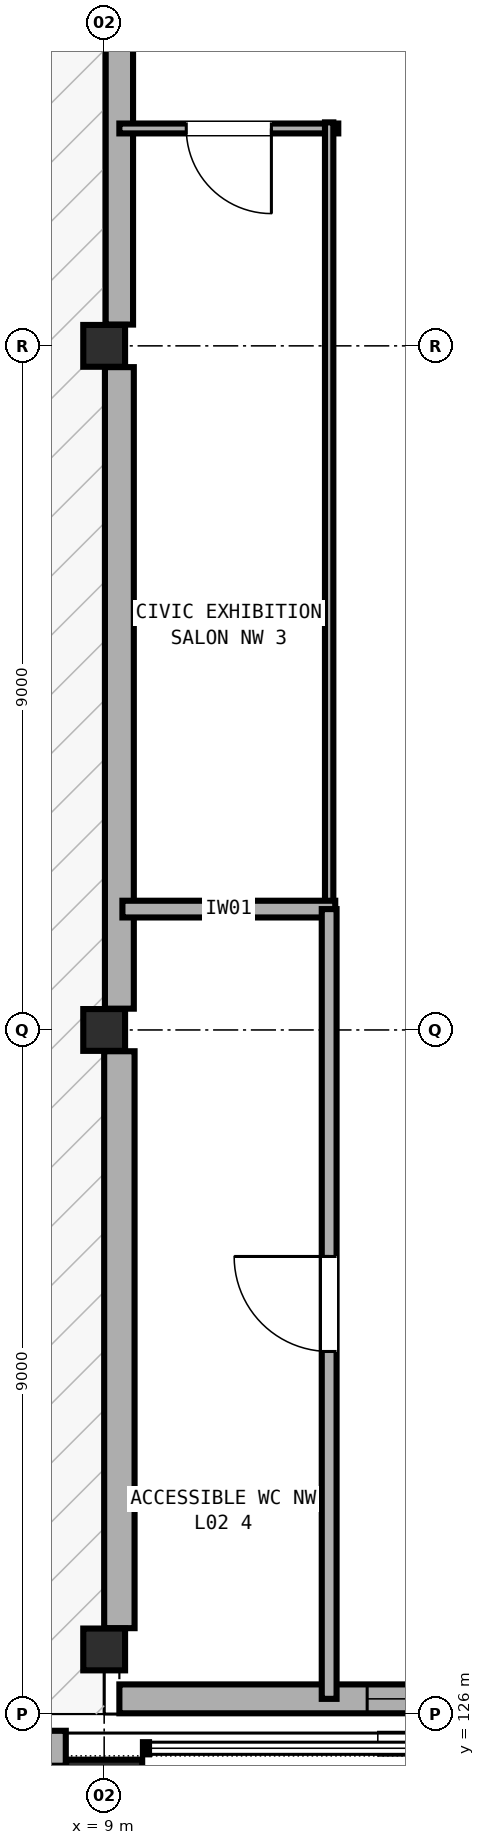
"""IFC4 building model, lengths in metres.
Left out: names, types, materials, properties, quantities, classifications, styles, units other than length and angle.
Written with IfcOpenShell. Run it as: python <this file> out.ifc"""

import sys

from ifc_helpers import new_model, si_unit, direction, frame, frame_2d, origin, origin_2d, place, context, subcontext, project, spatial, rectangle, extrude, element, fill, save


model = new_model("IFC4")
c1 = context("Model", 3, precision=1e-05, world=origin(), true_north=direction((0.0, 1.0)))
c2 = subcontext(c1, "Body", "Model", "MODEL_VIEW")
j1 = project(units=[si_unit("LENGTHUNIT", "METRE"), si_unit("PLANEANGLEUNIT", "RADIAN")], contexts=[c1])
p1 = place(None, origin())
s1 = spatial("IfcSite", under=j1, at=p1, CompositionType="ELEMENT")
p2 = place(p1, origin())
s2 = spatial("IfcBuilding", under=s1, at=p2, CompositionType="ELEMENT")
p3 = place(p2, frame((0.0, 0.0, 9.6)))
s3 = spatial("IfcBuildingStorey", under=s2, at=p3, CompositionType="ELEMENT", Elevation=9.6)
p4 = place(p3, frame((9.0, 124.9, 0.0), z_axis=(0.0, 0.0, 1.0), x_axis=(1.0, 0.0, 0.0)))
e1 = element("IfcColumn", 1, at=p4, inside=s3, PredefinedType="COLUMN", context=c2, shape_type="SweptSolid", body=[
    extrude(rectangle(XDim=1.0, YDim=1.0, at=origin_2d()), origin(), (0.0, 0.0, 1.0), 4.8),
])
for number, where, z_axis, x_axis in (
    (2, (9.0, 126.85, 0.0), (0.0, 0.0, 1.0), (1.0, 0.0, 0.0)),
    (3, (9.0, 135.0, 0.0), (0.0, 0.0, 1.0), (1.0, 0.0, 0.0)),
    (4, (9.0, 144.0, 0.0), (0.0, 0.0, 1.0), (1.0, 0.0, 0.0)),
):
    element("IfcColumn", number, at=place(p3, frame(where, z_axis=z_axis, x_axis=x_axis)), inside=s3, PredefinedType="COLUMN", context=c2, shape_type="SweptSolid", body=[
        extrude(rectangle(XDim=0.55, YDim=0.55, at=origin_2d()), origin(), (0.0, 0.0, 1.0), 4.8),
    ])
p5 = place(p3, frame((0.505, 125.55, 0.0), z_axis=(0.0, 0.0, 1.0), x_axis=(1.0, 0.0, 0.0)))
e5 = element("IfcWall", 5, at=p5, inside=s3, PredefinedType="SOLIDWALL", context=c2, shape_type="SweptSolid", body=[
    extrude(rectangle(XDim=7.99, YDim=0.46, at=frame_2d((3.995, 0.0))), origin(), (0.0, 0.0, 1.0), 3.58),
])
p6 = place(p5, frame((3.07, 0.0, 0.0)))
e6 = element("IfcOpeningElement", 6, at=p6, cuts=e5, PredefinedType="OPENING", context=c2, shape_type="SweptSolid", body=[
    extrude(rectangle(XDim=1.85, YDim=2.25, at=frame_2d((0.925, 1.125))), frame((0.0, 0.24, 0.0), z_axis=(0.0, -1.0, 0.0), x_axis=(1.0, 0.0, 0.0)), (0.0, 0.0, 1.0), 0.48),
])
p7 = place(p3, frame((9.2, 127.13, 0.0), z_axis=(0.0, 0.0, 1.0), x_axis=(0.0, 1.0, 0.0)))
e7 = element("IfcWall", 7, at=p7, inside=s3, PredefinedType="SOLIDWALL", context=c2, shape_type="SweptSolid", body=[
    extrude(rectangle(XDim=7.59, YDim=0.4, at=frame_2d((3.795, 0.0))), origin(), (0.0, 0.0, 1.0), 3.58),
])
p8 = place(p3, frame((9.2, 135.28, 0.0), z_axis=(0.0, 0.0, 1.0), x_axis=(0.0, 1.0, 0.0)))
e8 = element("IfcWall", 8, at=p8, inside=s3, PredefinedType="SOLIDWALL", context=c2, shape_type="SweptSolid", body=[
    extrude(rectangle(XDim=8.44, YDim=0.38, at=frame_2d((4.22, 0.0))), origin(), (0.0, 0.0, 1.0), 3.58),
])
p9 = place(p3, frame((9.2, 144.28, 0.0), z_axis=(0.0, 0.0, 1.0), x_axis=(0.0, 1.0, 0.0)))
e9 = element("IfcWall", 9, at=p9, inside=s3, PredefinedType="SOLIDWALL", context=c2, shape_type="SweptSolid", body=[
    extrude(rectangle(XDim=8.44, YDim=0.36, at=frame_2d((4.22, 0.0))), origin(), (0.0, 0.0, 1.0), 3.58),
])
p10 = place(p3, frame((18.12, 126.2, 0.0), z_axis=(0.0, 0.0, 1.0), x_axis=(-1.0, 0.0, 0.0)))
e10 = element("IfcWall", 10, at=p10, inside=s3, PredefinedType="SOLIDWALL", context=c2, shape_type="SweptSolid", body=[
    extrude(rectangle(XDim=8.92, YDim=0.38, at=frame_2d((4.46, 0.0))), origin(), (0.0, 0.0, 1.0), 3.58),
])
p11 = place(p10, frame((3.26, 0.0, 0.9)))
e11 = element("IfcOpeningElement", 11, at=p11, cuts=e10, PredefinedType="OPENING", context=c2, shape_type="SweptSolid", body=[
    extrude(rectangle(XDim=2.4, YDim=2.05, at=frame_2d((1.2, 1.025))), frame((0.0, 0.2, 0.0), z_axis=(0.0, -1.0, 0.0), x_axis=(1.0, 0.0, 0.0)), (0.0, 0.0, 1.0), 0.4),
])
p12 = place(p3, frame((12.08, 146.86, 0.0), z_axis=(0.0, 0.0, 1.0), x_axis=(-1.0, 0.0, 0.0)))
e12 = element("IfcWall", 12, at=p12, inside=s3, PredefinedType="PARTITIONING", context=c2, shape_type="SweptSolid", body=[
    extrude(rectangle(XDim=2.88, YDim=0.13, at=frame_2d((1.44, 0.0))), origin(), (0.0, 0.0, 1.0), 3.56),
])
p13 = place(p12, frame((0.88, 0.0, 0.0)))
e13 = element("IfcOpeningElement", 13, at=p13, cuts=e12, PredefinedType="OPENING", context=c2, shape_type="SweptSolid", body=[
    extrude(rectangle(XDim=1.12, YDim=2.22, at=frame_2d((0.56, 1.11))), frame((0.0, 0.075, 0.0), z_axis=(0.0, -1.0, 0.0), x_axis=(1.0, 0.0, 0.0)), (0.0, 0.0, 1.0), 0.15),
])
p14 = place(p3, frame((11.96, 146.94, 0.0), z_axis=(0.0, 0.0, 1.0), x_axis=(0.0, -1.0, 0.0)))
e14 = element("IfcWall", 14, at=p14, inside=s3, PredefinedType="PARTITIONING", context=c2, shape_type="SweptSolid", body=[
    extrude(rectangle(XDim=10.31, YDim=0.11, at=frame_2d((5.155, 0.0))), origin(), (0.0, 0.0, 1.0), 3.56),
])
p15 = place(p3, frame((12.04, 136.59, 0.0), z_axis=(0.0, 0.0, 1.0), x_axis=(-1.0, 0.0, 0.0)))
e15 = element("IfcWall", 15, at=p15, inside=s3, PredefinedType="PARTITIONING", context=c2, shape_type="SweptSolid", body=[
    extrude(rectangle(XDim=2.8, YDim=0.22, at=frame_2d((1.4, 0.0))), origin(), (0.0, 0.0, 1.0), 3.56),
])
p16 = place(p3, frame((11.96, 126.2, 0.0), z_axis=(0.0, 0.0, 1.0), x_axis=(0.0, 1.0, 0.0)))
e16 = element("IfcWall", 16, at=p16, inside=s3, PredefinedType="PARTITIONING", context=c2, shape_type="SweptSolid", body=[
    extrude(rectangle(XDim=10.39, YDim=0.195, at=frame_2d((5.195, 0.0))), origin(), (0.0, 0.0, 1.0), 3.56),
])
p17 = place(p16, frame((4.57, 0.0, 0.0)))
e17 = element("IfcOpeningElement", 17, at=p17, cuts=e16, PredefinedType="OPENING", context=c2, shape_type="SweptSolid", body=[
    extrude(rectangle(XDim=1.25, YDim=2.15, at=frame_2d((0.625, 1.075))), frame((0.0, 0.107, 0.0), z_axis=(0.0, -1.0, 0.0), x_axis=(1.0, 0.0, 0.0)), (0.0, 0.0, 1.0), 0.215),
])
p18 = place(p11, origin())
e18 = element("IfcWindow", 18, at=p18, inside=s3, PartitioningType="DOUBLE_PANEL_VERTICAL", PredefinedType="WINDOW", context=c2, shape_type="SweptSolid", body=[
    extrude(rectangle(XDim=2.4, YDim=2.05, at=frame_2d((1.2, 1.025))), frame((0.0, 0.03, 0.0), z_axis=(0.0, -1.0, 0.0), x_axis=(1.0, 0.0, 0.0)), (0.0, 0.0, 1.0), 0.06),
])
fill(e11, e18)
p19 = place(p13, origin())
e19 = element("IfcDoor", 19, at=p19, inside=s3, OperationType="SINGLE_SWING_LEFT", PredefinedType="DOOR", context=c2, shape_type="SweptSolid", body=[
    extrude(rectangle(XDim=1.12, YDim=2.22, at=frame_2d((0.56, 1.11))), frame((0.0, 0.025, 0.0), z_axis=(0.0, -1.0, 0.0), x_axis=(1.0, 0.0, 0.0)), (0.0, 0.0, 1.0), 0.05),
])
fill(e13, e19)
p20 = place(p17, origin())
e20 = element("IfcDoor", 20, at=p20, inside=s3, OperationType="SINGLE_SWING_RIGHT", PredefinedType="DOOR", context=c2, shape_type="SweptSolid", body=[
    extrude(rectangle(XDim=1.25, YDim=2.15, at=frame_2d((0.625, 1.075))), frame((0.0, 0.025, 0.0), z_axis=(0.0, -1.0, 0.0), x_axis=(1.0, 0.0, 0.0)), (0.0, 0.0, 1.0), 0.05),
])
fill(e17, e20)
save(model, sys.argv[1])
